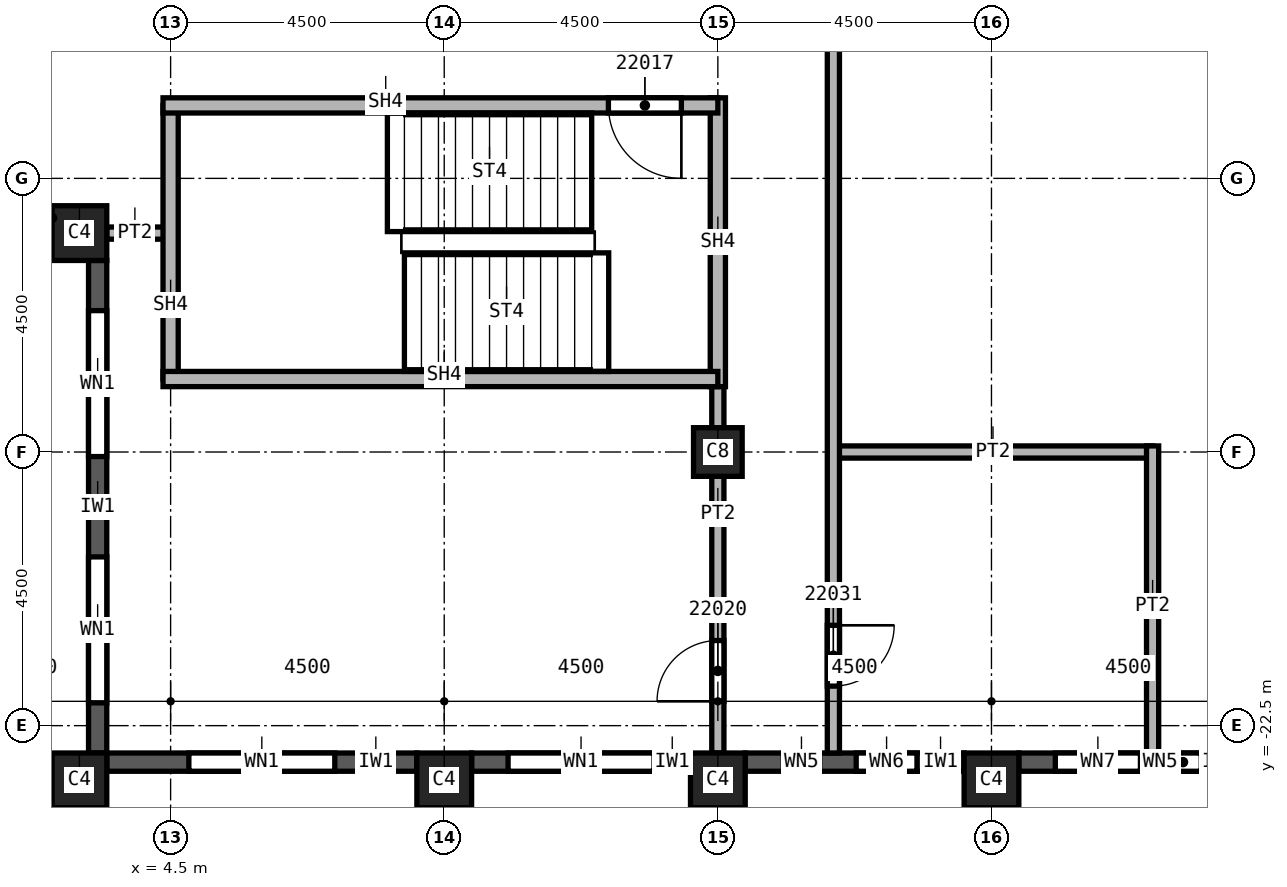
"""IFC4 building model, lengths in metres.
Left out: names, types, materials, properties, quantities, classifications, styles, units other than length and angle.
Written with IfcOpenShell. Run it as: python <this file> out.ifc"""

import sys

from ifc_helpers import new_model, si_unit, direction, frame, frame_2d, origin, origin_2d, place, context, subcontext, project, spatial, rectangle, extrude, element, fill, save


model = new_model("IFC4")
c1 = context("Model", 3, precision=1e-05, world=origin(), true_north=direction((0.0, 1.0)))
c2 = subcontext(c1, "Body", "Model", "MODEL_VIEW")
j1 = project(units=[si_unit("LENGTHUNIT", "METRE"), si_unit("PLANEANGLEUNIT", "RADIAN")], contexts=[c1])
p1 = place(None, origin())
s1 = spatial("IfcSite", under=j1, at=p1, CompositionType="ELEMENT")
p2 = place(p1, origin())
s2 = spatial("IfcBuilding", under=s1, at=p2, CompositionType="ELEMENT")
p3 = place(p2, frame((0.0, 0.0, 316.0)))
s3 = spatial("IfcBuildingStorey", under=s2, at=p3, CompositionType="ELEMENT", Elevation=316.0)
p4 = place(p3, frame((13.5, -18.0, 0.0), z_axis=(0.0, 0.0, 1.0), x_axis=(1.0, 0.0, 0.0)))
e1 = element("IfcColumn", 1, at=p4, inside=s3, PredefinedType="COLUMN", context=c2, shape_type="SweptSolid", body=[
    extrude(rectangle(XDim=0.8, YDim=0.8, at=origin_2d()), origin(), (0.0, 0.0, 1.0), 3.59),
])
for number, where, z_axis, x_axis in (
    (2, (3.0, -23.4, 0.0), (0.0, 0.0, 1.0), (1.0, 0.0, 0.0)),
    (3, (9.0, -23.4, 0.0), (0.0, 0.0, 1.0), (1.0, 0.0, 0.0)),
    (4, (13.5, -23.4, 0.0), (0.0, 0.0, 1.0), (1.0, 0.0, 0.0)),
    (5, (18.0, -23.4, 0.0), (0.0, 0.0, 1.0), (1.0, 0.0, 0.0)),
    (6, (3.0, -14.4, 0.0), (0.0, 0.0, 1.0), (1.0, 0.0, 0.0)),
):
    element("IfcColumn", number, at=place(p3, frame(where, z_axis=z_axis, x_axis=x_axis)), inside=s3, PredefinedType="COLUMN", context=c2, shape_type="SweptSolid", body=[
        extrude(rectangle(XDim=0.9, YDim=0.9, at=origin_2d()), origin(), (0.0, 0.0, 1.0), 3.59),
    ])
p5 = place(p3, frame((3.3, -14.85, 0.0), z_axis=(0.0, 0.0, 1.0), x_axis=(0.0, -1.0, 0.0)))
e7 = element("IfcWall", 7, at=p5, inside=s3, PredefinedType="SOLIDWALL", context=c2, shape_type="SweptSolid", body=[
    extrude(rectangle(XDim=8.1, YDim=0.3, at=frame_2d((4.05, 0.0))), origin(), (0.0, 0.0, 1.0), 2.99),
])
p6 = place(p5, frame((0.825, 0.0, 0.8)))
e8 = element("IfcOpeningElement", 8, at=p6, cuts=e7, PredefinedType="OPENING", context=c2, shape_type="SweptSolid", body=[
    extrude(rectangle(XDim=2.4, YDim=1.95, at=frame_2d((1.2, 0.975))), frame((0.0, 0.15, 0.0), z_axis=(0.0, -1.0, 0.0), x_axis=(1.0, 0.0, 0.0)), (0.0, 0.0, 1.0), 0.3),
])
p7 = place(p5, frame((4.875, 0.0, 0.8)))
e9 = element("IfcOpeningElement", 9, at=p7, cuts=e7, PredefinedType="OPENING", context=c2, shape_type="SweptSolid", body=[
    extrude(rectangle(XDim=2.4, YDim=1.95, at=frame_2d((1.2, 0.975))), frame((0.0, 0.15, 0.0), z_axis=(0.0, -1.0, 0.0), x_axis=(1.0, 0.0, 0.0)), (0.0, 0.0, 1.0), 0.3),
])
p8 = place(p3, frame((3.45, -23.1, 0.0), z_axis=(0.0, 0.0, 1.0), x_axis=(1.0, 0.0, 0.0)))
e10 = element("IfcWall", 10, at=p8, inside=s3, PredefinedType="SOLIDWALL", context=c2, shape_type="SweptSolid", body=[
    extrude(rectangle(XDim=5.1, YDim=0.3, at=frame_2d((2.55, 0.0))), origin(), (0.0, 0.0, 1.0), 2.99),
])
p9 = place(p8, frame((1.35, 0.0, 0.8)))
e11 = element("IfcOpeningElement", 11, at=p9, cuts=e10, PredefinedType="OPENING", context=c2, shape_type="SweptSolid", body=[
    extrude(rectangle(XDim=2.4, YDim=1.95, at=frame_2d((1.2, 0.975))), frame((0.0, 0.15, 0.0), z_axis=(0.0, -1.0, 0.0), x_axis=(1.0, 0.0, 0.0)), (0.0, 0.0, 1.0), 0.3),
])
p10 = place(p3, frame((9.45, -23.1, 0.0), z_axis=(0.0, 0.0, 1.0), x_axis=(1.0, 0.0, 0.0)))
e12 = element("IfcWall", 12, at=p10, inside=s3, PredefinedType="SOLIDWALL", context=c2, shape_type="SweptSolid", body=[
    extrude(rectangle(XDim=3.6, YDim=0.3, at=frame_2d((1.8, 0.0))), origin(), (0.0, 0.0, 1.0), 2.99),
])
p11 = place(p10, frame((0.6, 0.0, 0.8)))
e13 = element("IfcOpeningElement", 13, at=p11, cuts=e12, PredefinedType="OPENING", context=c2, shape_type="SweptSolid", body=[
    extrude(rectangle(XDim=2.4, YDim=1.95, at=frame_2d((1.2, 0.975))), frame((0.0, 0.15, 0.0), z_axis=(0.0, -1.0, 0.0), x_axis=(1.0, 0.0, 0.0)), (0.0, 0.0, 1.0), 0.3),
])
p12 = place(p3, frame((13.95, -23.1, 0.0), z_axis=(0.0, 0.0, 1.0), x_axis=(1.0, 0.0, 0.0)))
e14 = element("IfcWall", 14, at=p12, inside=s3, PredefinedType="SOLIDWALL", context=c2, shape_type="SweptSolid", body=[
    extrude(rectangle(XDim=3.6, YDim=0.3, at=frame_2d((1.8, 0.0))), origin(), (0.0, 0.0, 1.0), 2.99),
])
p13 = place(p12, frame((0.625, 0.0, 0.8)))
e15 = element("IfcOpeningElement", 15, at=p13, cuts=e14, PredefinedType="OPENING", context=c2, shape_type="SweptSolid", body=[
    extrude(rectangle(XDim=0.6, YDim=1.95, at=frame_2d((0.3, 0.975))), frame((0.0, 0.15, 0.0), z_axis=(0.0, -1.0, 0.0), x_axis=(1.0, 0.0, 0.0)), (0.0, 0.0, 1.0), 0.3),
])
p14 = place(p12, frame((1.825, 0.0, 0.8)))
e16 = element("IfcOpeningElement", 16, at=p14, cuts=e14, PredefinedType="OPENING", context=c2, shape_type="SweptSolid", body=[
    extrude(rectangle(XDim=1.0, YDim=1.95, at=frame_2d((0.5, 0.975))), frame((0.0, 0.15, 0.0), z_axis=(0.0, -1.0, 0.0), x_axis=(1.0, 0.0, 0.0)), (0.0, 0.0, 1.0), 0.3),
])
p15 = place(p3, frame((18.45, -23.1, 0.0), z_axis=(0.0, 0.0, 1.0), x_axis=(1.0, 0.0, 0.0)))
e17 = element("IfcWall", 17, at=p15, inside=s3, PredefinedType="SOLIDWALL", context=c2, shape_type="SweptSolid", body=[
    extrude(rectangle(XDim=3.6, YDim=0.3, at=frame_2d((1.8, 0.0))), origin(), (0.0, 0.0, 1.0), 2.99),
])
p16 = place(p15, frame((0.6, 0.0, 0.8)))
e18 = element("IfcOpeningElement", 18, at=p16, cuts=e17, PredefinedType="OPENING", context=c2, shape_type="SweptSolid", body=[
    extrude(rectangle(XDim=1.4, YDim=1.95, at=frame_2d((0.7, 0.975))), frame((0.0, 0.15, 0.0), z_axis=(0.0, -1.0, 0.0), x_axis=(1.0, 0.0, 0.0)), (0.0, 0.0, 1.0), 0.3),
])
p17 = place(p15, frame((2.4, 0.0, 0.8)))
e19 = element("IfcOpeningElement", 19, at=p17, cuts=e17, PredefinedType="OPENING", context=c2, shape_type="SweptSolid", body=[
    extrude(rectangle(XDim=0.6, YDim=1.95, at=frame_2d((0.3, 0.975))), frame((0.0, 0.15, 0.0), z_axis=(0.0, -1.0, 0.0), x_axis=(1.0, 0.0, 0.0)), (0.0, 0.0, 1.0), 0.3),
])
p18 = place(p3, frame((4.5, -14.4, 0.0), z_axis=(0.0, 0.0, 1.0), x_axis=(-1.0, 0.0, 0.0)))
e20 = element("IfcWall", 20, at=p18, inside=s3, PredefinedType="PARTITIONING", context=c2, shape_type="SweptSolid", body=[
    extrude(rectangle(XDim=1.05, YDim=0.2, at=frame_2d((0.525, 0.0))), origin(), (0.0, 0.0, 1.0), 3.59),
])
p19 = place(p3, frame((13.5, -22.95, 0.0), z_axis=(0.0, 0.0, 1.0), x_axis=(0.0, 1.0, 0.0)))
e21 = element("IfcWall", 21, at=p19, inside=s3, PredefinedType="PARTITIONING", context=c2, shape_type="SweptSolid", body=[
    extrude(rectangle(XDim=6.275, YDim=0.2, at=frame_2d((3.137, 0.0))), origin(), (0.0, 0.0, 1.0), 3.59),
])
p20 = place(p19, frame((0.85, 0.0, 0.0)))
e22 = element("IfcOpeningElement", 22, at=p20, cuts=e21, PredefinedType="OPENING", context=c2, shape_type="SweptSolid", body=[
    extrude(rectangle(XDim=1.0, YDim=2.1, at=frame_2d((0.5, 1.05))), frame((0.0, 0.1, 0.0), z_axis=(0.0, -1.0, 0.0), x_axis=(1.0, 0.0, 0.0)), (0.0, 0.0, 1.0), 0.2),
])
p21 = place(p3, frame((15.4, -18.0, 0.0), z_axis=(0.0, 0.0, 1.0), x_axis=(1.0, 0.0, 0.0)))
e23 = element("IfcWall", 23, at=p21, inside=s3, PredefinedType="PARTITIONING", context=c2, shape_type="SweptSolid", body=[
    extrude(rectangle(XDim=5.25, YDim=0.2, at=frame_2d((2.625, 0.0))), origin(), (0.0, 0.0, 1.0), 3.59),
])
p22 = place(p3, frame((15.4, 22.95, 0.0), z_axis=(0.0, 0.0, 1.0), x_axis=(0.0, -1.0, 0.0)))
e24 = element("IfcWall", 24, at=p22, inside=s3, PredefinedType="PARTITIONING", context=c2, shape_type="SweptSolid", body=[
    extrude(rectangle(XDim=45.9, YDim=0.2, at=frame_2d((22.95, 0.0))), origin(), (0.0, 0.0, 1.0), 3.59),
])
p23 = place(p22, frame((15.0, 0.0, 0.0)))
e25 = element("IfcOpeningElement", 25, at=p23, cuts=e24, PredefinedType="OPENING", context=c2, shape_type="SweptSolid", body=[
    extrude(rectangle(XDim=1.0, YDim=2.1, at=frame_2d((0.5, 1.05))), frame((0.0, 0.1, 0.0), z_axis=(0.0, -1.0, 0.0), x_axis=(1.0, 0.0, 0.0)), (0.0, 0.0, 1.0), 0.2),
])
p24 = place(p22, frame((8.05, 0.0, 0.0)))
e26 = element("IfcOpeningElement", 26, at=p24, cuts=e24, PredefinedType="OPENING", context=c2, shape_type="SweptSolid", body=[
    extrude(rectangle(XDim=1.0, YDim=2.1, at=frame_2d((0.5, 1.05))), frame((0.0, 0.1, 0.0), z_axis=(0.0, -1.0, 0.0), x_axis=(1.0, 0.0, 0.0)), (0.0, 0.0, 1.0), 0.2),
])
p25 = place(p22, frame((43.8, 0.0, 0.0)))
e27 = element("IfcOpeningElement", 27, at=p25, cuts=e24, PredefinedType="OPENING", context=c2, shape_type="SweptSolid", body=[
    extrude(rectangle(XDim=1.0, YDim=2.1, at=frame_2d((0.5, 1.05))), frame((0.0, 0.1, 0.0), z_axis=(0.0, -1.0, 0.0), x_axis=(1.0, 0.0, 0.0)), (0.0, 0.0, 1.0), 0.2),
])
p26 = place(p22, frame((30.3, 0.0, 0.0)))
e28 = element("IfcOpeningElement", 28, at=p26, cuts=e24, PredefinedType="OPENING", context=c2, shape_type="SweptSolid", body=[
    extrude(rectangle(XDim=1.0, YDim=2.1, at=frame_2d((0.5, 1.05))), frame((0.0, 0.1, 0.0), z_axis=(0.0, -1.0, 0.0), x_axis=(1.0, 0.0, 0.0)), (0.0, 0.0, 1.0), 0.2),
])
p27 = place(p3, frame((20.65, -17.9, 0.0), z_axis=(0.0, 0.0, 1.0), x_axis=(0.0, -1.0, 0.0)))
e29 = element("IfcWall", 29, at=p27, inside=s3, PredefinedType="PARTITIONING", context=c2, shape_type="SweptSolid", body=[
    extrude(rectangle(XDim=5.05, YDim=0.2, at=frame_2d((2.525, 0.0))), origin(), (0.0, 0.0, 1.0), 3.59),
])
p28 = place(p3, frame((4.5, -16.8, 0.0), z_axis=(0.0, 0.0, 1.0), x_axis=(0.0, 1.0, 0.0)))
e30 = element("IfcWall", 30, at=p28, inside=s3, PredefinedType="SOLIDWALL", context=c2, shape_type="SweptSolid", body=[
    extrude(rectangle(XDim=4.5, YDim=0.25, at=frame_2d((2.25, 0.0))), origin(), (0.0, 0.0, 1.0), 3.59),
])
p29 = place(p3, frame((13.5, -16.925, 0.0), z_axis=(0.0, 0.0, 1.0), x_axis=(0.0, 1.0, 0.0)))
e31 = element("IfcWall", 31, at=p29, inside=s3, PredefinedType="SOLIDWALL", context=c2, shape_type="SweptSolid", body=[
    extrude(rectangle(XDim=4.75, YDim=0.25, at=frame_2d((2.375, 0.0))), origin(), (0.0, 0.0, 1.0), 3.59),
])
p30 = place(p3, frame((13.5, -16.8, 0.0), z_axis=(0.0, 0.0, 1.0), x_axis=(-1.0, 0.0, 0.0)))
e32 = element("IfcWall", 32, at=p30, inside=s3, PredefinedType="SOLIDWALL", context=c2, shape_type="SweptSolid", body=[
    extrude(rectangle(XDim=9.125, YDim=0.25, at=frame_2d((4.562, 0.0))), origin(), (0.0, 0.0, 1.0), 3.59),
])
p31 = place(p3, frame((13.5, -12.3, 0.0), z_axis=(0.0, 0.0, 1.0), x_axis=(-1.0, 0.0, 0.0)))
e33 = element("IfcWall", 33, at=p31, inside=s3, PredefinedType="SOLIDWALL", context=c2, shape_type="SweptSolid", body=[
    extrude(rectangle(XDim=9.125, YDim=0.25, at=frame_2d((4.562, 0.0))), origin(), (0.0, 0.0, 1.0), 3.59),
])
p32 = place(p31, frame((0.6, 0.0, 0.0)))
e34 = element("IfcOpeningElement", 34, at=p32, cuts=e33, PredefinedType="OPENING", context=c2, shape_type="SweptSolid", body=[
    extrude(rectangle(XDim=1.2, YDim=2.1, at=frame_2d((0.6, 1.05))), frame((0.0, 0.125, 0.0), z_axis=(0.0, -1.0, 0.0), x_axis=(1.0, 0.0, 0.0)), (0.0, 0.0, 1.0), 0.25),
])
p33 = place(p6, origin())
e35 = element("IfcWindow", 35, at=p33, inside=s3, PartitioningType="SINGLE_PANEL", PredefinedType="WINDOW", context=c2, shape_type="SweptSolid", body=[
    extrude(rectangle(XDim=2.4, YDim=1.95, at=frame_2d((1.2, 0.975))), frame((0.0, 0.03, 0.0), z_axis=(0.0, -1.0, 0.0), x_axis=(1.0, 0.0, 0.0)), (0.0, 0.0, 1.0), 0.06),
])
fill(e8, e35)
p34 = place(p7, origin())
e36 = element("IfcWindow", 36, at=p34, inside=s3, PartitioningType="SINGLE_PANEL", PredefinedType="WINDOW", context=c2, shape_type="SweptSolid", body=[
    extrude(rectangle(XDim=2.4, YDim=1.95, at=frame_2d((1.2, 0.975))), frame((0.0, 0.03, 0.0), z_axis=(0.0, -1.0, 0.0), x_axis=(1.0, 0.0, 0.0)), (0.0, 0.0, 1.0), 0.06),
])
fill(e9, e36)
p35 = place(p9, origin())
e37 = element("IfcWindow", 37, at=p35, inside=s3, PartitioningType="SINGLE_PANEL", PredefinedType="WINDOW", context=c2, shape_type="SweptSolid", body=[
    extrude(rectangle(XDim=2.4, YDim=1.95, at=frame_2d((1.2, 0.975))), frame((0.0, 0.03, 0.0), z_axis=(0.0, -1.0, 0.0), x_axis=(1.0, 0.0, 0.0)), (0.0, 0.0, 1.0), 0.06),
])
fill(e11, e37)
p36 = place(p11, origin())
e38 = element("IfcWindow", 38, at=p36, inside=s3, PartitioningType="SINGLE_PANEL", PredefinedType="WINDOW", context=c2, shape_type="SweptSolid", body=[
    extrude(rectangle(XDim=2.4, YDim=1.95, at=frame_2d((1.2, 0.975))), frame((0.0, 0.03, 0.0), z_axis=(0.0, -1.0, 0.0), x_axis=(1.0, 0.0, 0.0)), (0.0, 0.0, 1.0), 0.06),
])
fill(e13, e38)
p37 = place(p32, origin())
e39 = element("IfcDoor", 39, at=p37, inside=s3, OperationType="SINGLE_SWING_RIGHT", PredefinedType="DOOR", context=c2, shape_type="SweptSolid", body=[
    extrude(rectangle(XDim=1.2, YDim=2.1, at=frame_2d((0.6, 1.05))), frame((0.0, 0.025, 0.0), z_axis=(0.0, -1.0, 0.0), x_axis=(1.0, 0.0, 0.0)), (0.0, 0.0, 1.0), 0.05),
])
fill(e34, e39)
p38 = place(p20, origin())
e40 = element("IfcDoor", 40, at=p38, inside=s3, OperationType="SINGLE_SWING_LEFT", PredefinedType="DOOR", context=c2, shape_type="SweptSolid", body=[
    extrude(rectangle(XDim=1.0, YDim=2.1, at=frame_2d((0.5, 1.05))), frame((0.0, 0.025, 0.0), z_axis=(0.0, -1.0, 0.0), x_axis=(1.0, 0.0, 0.0)), (0.0, 0.0, 1.0), 0.05),
])
fill(e22, e40)
p39 = place(p25, origin())
e41 = element("IfcDoor", 41, at=p39, inside=s3, OperationType="SINGLE_SWING_RIGHT", PredefinedType="DOOR", context=c2, shape_type="SweptSolid", body=[
    extrude(rectangle(XDim=1.0, YDim=2.1, at=frame_2d((0.5, 1.05))), frame((0.0, 0.025, 0.0), z_axis=(0.0, -1.0, 0.0), x_axis=(1.0, 0.0, 0.0)), (0.0, 0.0, 1.0), 0.05),
])
fill(e27, e41)
p40 = place(p13, origin())
e42 = element("IfcWindow", 42, at=p40, inside=s3, PartitioningType="SINGLE_PANEL", PredefinedType="WINDOW", context=c2, shape_type="SweptSolid", body=[
    extrude(rectangle(XDim=0.6, YDim=1.95, at=frame_2d((0.3, 0.975))), frame((0.0, 0.03, 0.0), z_axis=(0.0, -1.0, 0.0), x_axis=(1.0, 0.0, 0.0)), (0.0, 0.0, 1.0), 0.06),
])
fill(e15, e42)
p41 = place(p14, origin())
e43 = element("IfcWindow", 43, at=p41, inside=s3, PartitioningType="SINGLE_PANEL", PredefinedType="WINDOW", context=c2, shape_type="SweptSolid", body=[
    extrude(rectangle(XDim=1.0, YDim=1.95, at=frame_2d((0.5, 0.975))), frame((0.0, 0.03, 0.0), z_axis=(0.0, -1.0, 0.0), x_axis=(1.0, 0.0, 0.0)), (0.0, 0.0, 1.0), 0.06),
])
fill(e16, e43)
p42 = place(p16, origin())
e44 = element("IfcWindow", 44, at=p42, inside=s3, PartitioningType="SINGLE_PANEL", PredefinedType="WINDOW", context=c2, shape_type="SweptSolid", body=[
    extrude(rectangle(XDim=1.4, YDim=1.95, at=frame_2d((0.7, 0.975))), frame((0.0, 0.03, 0.0), z_axis=(0.0, -1.0, 0.0), x_axis=(1.0, 0.0, 0.0)), (0.0, 0.0, 1.0), 0.06),
])
fill(e18, e44)
p43 = place(p17, origin())
e45 = element("IfcWindow", 45, at=p43, inside=s3, PartitioningType="SINGLE_PANEL", PredefinedType="WINDOW", context=c2, shape_type="SweptSolid", body=[
    extrude(rectangle(XDim=0.6, YDim=1.95, at=frame_2d((0.3, 0.975))), frame((0.0, 0.03, 0.0), z_axis=(0.0, -1.0, 0.0), x_axis=(1.0, 0.0, 0.0)), (0.0, 0.0, 1.0), 0.06),
])
fill(e19, e45)
save(model, sys.argv[1])
